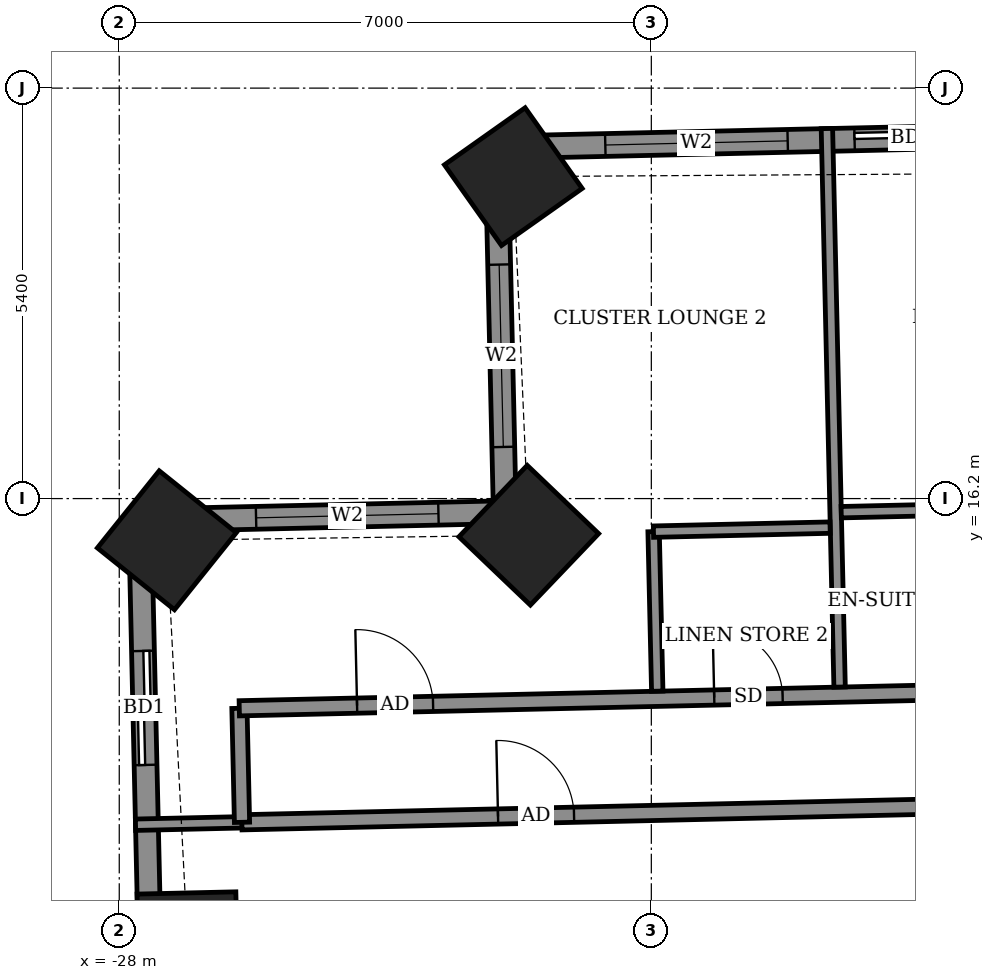
"""IFC4 building model, lengths in metres.
Left out: names, types, materials, properties, quantities, classifications, styles, units other than length and angle.
Written with IfcOpenShell. Run it as: python <this file> out.ifc"""

import sys

from ifc_helpers import new_model, si_unit, direction, frame, frame_2d, origin, origin_2d, place, context, subcontext, project, spatial, rectangle, extrude, element, fill, save


model = new_model("IFC4")
c1 = context("Model", 3, precision=1e-05, world=origin(), true_north=direction((0.0, 1.0)))
c2 = subcontext(c1, "Body", "Model", "MODEL_VIEW")
j1 = project(units=[si_unit("LENGTHUNIT", "METRE"), si_unit("PLANEANGLEUNIT", "RADIAN")], contexts=[c1])
p1 = place(None, origin())
s1 = spatial("IfcSite", under=j1, at=p1, CompositionType="ELEMENT")
p2 = place(p1, origin())
s2 = spatial("IfcBuilding", under=s1, at=p2, CompositionType="ELEMENT")
p3 = place(p2, frame((0.0, 0.0, 140.9)))
s3 = spatial("IfcBuildingStorey", under=s2, at=p3, CompositionType="ELEMENT", Elevation=140.9)
for number, where, z_axis, x_axis in (
    (1, (-22.816, 20.435, -0.55), (0.0, 0.0, 1.0), (-0.816, -0.577, 0.0)),
    (2, (-22.612, 15.718, -0.55), (0.0, 0.0, 1.0), (-0.691, -0.723, 0.0)),
    (3, (-27.374, 15.651, -0.55), (0.0, 0.0, 1.0), (-0.626, -0.78, 0.0)),
    (4, (-27.101, 10.362, -0.55), (0.0, 0.0, 1.0), (0.023, -1.0, 0.0)),
):
    element("IfcColumn", number, at=place(p3, frame(where, z_axis=z_axis, x_axis=x_axis)), inside=s3, PredefinedType="COLUMN", context=c2, shape_type="SweptSolid", body=[
        extrude(rectangle(XDim=1.3, YDim=1.3, at=origin_2d()), origin(), (0.0, 0.0, 1.0), 3.6),
    ])
p4 = place(p3, frame((19.396, 21.782, 0.0), z_axis=(0.0, 0.0, 1.0), x_axis=(-0.999742636707, -0.022686126826, 0.0)))
e5 = element("IfcWall", 5, at=p4, inside=s3, PredefinedType="SOLIDWALL", context=c2, shape_type="SweptSolid", body=[
    extrude(rectangle(XDim=42.444, YDim=0.3, at=frame_2d((21.222, 0.0))), origin(), (0.0, 0.0, 1.0), 3.05),
])
p5 = place(p4, frame((1.757, 0.0, 0.0)))
e6 = element("IfcOpeningElement", 6, at=p5, cuts=e5, PredefinedType="OPENING", context=c2, shape_type="SweptSolid", body=[
    extrude(rectangle(XDim=1.5, YDim=2.4, at=frame_2d((0.75, 1.2))), frame((0.0, 0.16, 0.0), z_axis=(0.0, -1.0, 0.0), x_axis=(1.0, 0.0, 0.0)), (0.0, 0.0, 1.0), 0.32),
])
p6 = place(p4, frame((4.634, 0.0, 0.0)))
e7 = element("IfcOpeningElement", 7, at=p6, cuts=e5, PredefinedType="OPENING", context=c2, shape_type="SweptSolid", body=[
    extrude(rectangle(XDim=1.5, YDim=2.4, at=frame_2d((0.75, 1.2))), frame((0.0, 0.16, 0.0), z_axis=(0.0, -1.0, 0.0), x_axis=(1.0, 0.0, 0.0)), (0.0, 0.0, 1.0), 0.32),
])
p7 = place(p4, frame((9.769, 0.0, 0.0)))
e8 = element("IfcOpeningElement", 8, at=p7, cuts=e5, PredefinedType="OPENING", context=c2, shape_type="SweptSolid", body=[
    extrude(rectangle(XDim=1.5, YDim=2.4, at=frame_2d((0.75, 1.2))), frame((0.0, 0.16, 0.0), z_axis=(0.0, -1.0, 0.0), x_axis=(1.0, 0.0, 0.0)), (0.0, 0.0, 1.0), 0.32),
])
p8 = place(p4, frame((14.946, 0.0, 0.0)))
e9 = element("IfcOpeningElement", 9, at=p8, cuts=e5, PredefinedType="OPENING", context=c2, shape_type="SweptSolid", body=[
    extrude(rectangle(XDim=1.5, YDim=2.4, at=frame_2d((0.75, 1.2))), frame((0.0, 0.16, 0.0), z_axis=(0.0, -1.0, 0.0), x_axis=(1.0, 0.0, 0.0)), (0.0, 0.0, 1.0), 0.32),
])
p9 = place(p4, frame((18.108, 0.0, 0.0)))
e10 = element("IfcOpeningElement", 10, at=p9, cuts=e5, PredefinedType="OPENING", context=c2, shape_type="SweptSolid", body=[
    extrude(rectangle(XDim=1.5, YDim=2.4, at=frame_2d((0.75, 1.2))), frame((0.0, 0.16, 0.0), z_axis=(0.0, -1.0, 0.0), x_axis=(1.0, 0.0, 0.0)), (0.0, 0.0, 1.0), 0.32),
])
p10 = place(p4, frame((22.733, 0.0, 0.0)))
e11 = element("IfcOpeningElement", 11, at=p10, cuts=e5, PredefinedType="OPENING", context=c2, shape_type="SweptSolid", body=[
    extrude(rectangle(XDim=1.5, YDim=2.4, at=frame_2d((0.75, 1.2))), frame((0.0, 0.16, 0.0), z_axis=(0.0, -1.0, 0.0), x_axis=(1.0, 0.0, 0.0)), (0.0, 0.0, 1.0), 0.32),
])
p11 = place(p4, frame((25.895, 0.0, 0.0)))
e12 = element("IfcOpeningElement", 12, at=p11, cuts=e5, PredefinedType="OPENING", context=c2, shape_type="SweptSolid", body=[
    extrude(rectangle(XDim=1.5, YDim=2.4, at=frame_2d((0.75, 1.2))), frame((0.0, 0.16, 0.0), z_axis=(0.0, -1.0, 0.0), x_axis=(1.0, 0.0, 0.0)), (0.0, 0.0, 1.0), 0.32),
])
p12 = place(p4, frame((30.944, 0.0, 0.0)))
e13 = element("IfcOpeningElement", 13, at=p12, cuts=e5, PredefinedType="OPENING", context=c2, shape_type="SweptSolid", body=[
    extrude(rectangle(XDim=1.5, YDim=2.4, at=frame_2d((0.75, 1.2))), frame((0.0, 0.16, 0.0), z_axis=(0.0, -1.0, 0.0), x_axis=(1.0, 0.0, 0.0)), (0.0, 0.0, 1.0), 0.32),
])
p13 = place(p4, frame((36.232, 0.0, 0.0)))
e14 = element("IfcOpeningElement", 14, at=p13, cuts=e5, PredefinedType="OPENING", context=c2, shape_type="SweptSolid", body=[
    extrude(rectangle(XDim=1.5, YDim=2.4, at=frame_2d((0.75, 1.2))), frame((0.0, 0.16, 0.0), z_axis=(0.0, -1.0, 0.0), x_axis=(1.0, 0.0, 0.0)), (0.0, 0.0, 1.0), 0.32),
])
p14 = place(p4, frame((38.612, 0.0, 0.9)))
e15 = element("IfcOpeningElement", 15, at=p14, cuts=e5, PredefinedType="OPENING", context=c2, shape_type="SweptSolid", body=[
    extrude(rectangle(XDim=2.4, YDim=1.5, at=frame_2d((1.2, 0.75))), frame((0.0, 0.16, 0.0), z_axis=(0.0, -1.0, 0.0), x_axis=(1.0, 0.0, 0.0)), (0.0, 0.0, 1.0), 0.32),
])
p15 = place(p3, frame((-23.037, 20.819, 0.0), z_axis=(0.0, 0.0, 1.0), x_axis=(0.022738738327, -0.999741441463, 0.0)))
e16 = element("IfcWall", 16, at=p15, inside=s3, PredefinedType="SOLIDWALL", context=c2, shape_type="SweptSolid", body=[
    extrude(rectangle(XDim=4.799, YDim=0.3, at=frame_2d((2.4, 0.0))), origin(), (0.0, 0.0, 1.0), 2.55),
])
p16 = place(p15, frame((1.541, 0.0, 0.9)))
e17 = element("IfcOpeningElement", 17, at=p16, cuts=e16, PredefinedType="OPENING", context=c2, shape_type="SweptSolid", body=[
    extrude(rectangle(XDim=2.4, YDim=1.5, at=frame_2d((1.2, 0.75))), frame((0.0, 0.16, 0.0), z_axis=(0.0, -1.0, 0.0), x_axis=(1.0, 0.0, 0.0)), (0.0, 0.0, 1.0), 0.32),
])
p17 = place(p3, frame((-22.928, 16.021, 0.0), z_axis=(0.0, 0.0, 1.0), x_axis=(-0.999742701292, -0.022683280499, 0.0)))
e18 = element("IfcWall", 18, at=p17, inside=s3, PredefinedType="SOLIDWALL", context=c2, shape_type="SweptSolid", body=[
    extrude(rectangle(XDim=4.8, YDim=0.3, at=frame_2d((2.4, 0.0))), origin(), (0.0, 0.0, 1.0), 2.55),
])
p18 = place(p17, frame((0.873, 0.0, 0.9)))
e19 = element("IfcOpeningElement", 19, at=p18, cuts=e18, PredefinedType="OPENING", context=c2, shape_type="SweptSolid", body=[
    extrude(rectangle(XDim=2.4, YDim=1.5, at=frame_2d((1.2, 0.75))), frame((0.0, 0.16, 0.0), z_axis=(0.0, -1.0, 0.0), x_axis=(1.0, 0.0, 0.0)), (0.0, 0.0, 1.0), 0.32),
])
p19 = place(p3, frame((-27.727, 15.912, 0.0), z_axis=(0.0, 0.0, 1.0), x_axis=(0.022690078929, -0.999742547018, 0.0)))
e20 = element("IfcWall", 20, at=p19, inside=s3, PredefinedType="SOLIDWALL", context=c2, shape_type="SweptSolid", body=[
    extrude(rectangle(XDim=11.33, YDim=0.3, at=frame_2d((5.665, 0.0))), origin(), (0.0, 0.0, 1.0), 3.05),
])
p20 = place(p19, frame((1.717, 0.0, 0.0)))
e21 = element("IfcOpeningElement", 21, at=p20, cuts=e20, PredefinedType="OPENING", context=c2, shape_type="SweptSolid", body=[
    extrude(rectangle(XDim=1.5, YDim=2.4, at=frame_2d((0.75, 1.2))), frame((0.0, 0.16, 0.0), z_axis=(0.0, -1.0, 0.0), x_axis=(1.0, 0.0, 0.0)), (0.0, 0.0, 1.0), 0.32),
])
p21 = place(p19, frame((7.725, 0.0, 0.9)))
e22 = element("IfcOpeningElement", 22, at=p21, cuts=e20, PredefinedType="OPENING", context=c2, shape_type="SweptSolid", body=[
    extrude(rectangle(XDim=2.4, YDim=1.5, at=frame_2d((1.2, 0.75))), frame((0.0, 0.16, 0.0), z_axis=(0.0, -1.0, 0.0), x_axis=(1.0, 0.0, 0.0)), (0.0, 0.0, 1.0), 0.32),
])
p22 = place(p3, frame((-27.786, 11.909, 0.0), z_axis=(0.0, 0.0, 1.0), x_axis=(0.999740216184, 0.022792545827, 0.0)))
e23 = element("IfcWall", 23, at=p22, inside=s3, PredefinedType="PARTITIONING", context=c2, shape_type="SweptSolid", body=[
    extrude(rectangle(XDim=1.403, YDim=0.15, at=frame_2d((0.702, 0.0))), origin(), (0.0, 0.0, 1.0), 2.55),
])
p23 = place(p3, frame((-26.387, 11.941, 0.0), z_axis=(0.0, 0.0, 1.0), x_axis=(0.999741076645, 0.022754772455, 0.0)))
e24 = element("IfcWall", 24, at=p23, inside=s3, PredefinedType="PARTITIONING", context=c2, shape_type="SweptSolid", body=[
    extrude(rectangle(XDim=9.141, YDim=0.2, at=frame_2d((4.571, 0.0))), origin(), (0.0, 0.0, 1.0), 3.05),
])
p24 = place(p23, frame((3.371, 0.0, 0.0)))
e25 = element("IfcOpeningElement", 25, at=p24, cuts=e24, PredefinedType="OPENING", context=c2, shape_type="SweptSolid", body=[
    extrude(rectangle(XDim=1.0, YDim=2.1, at=frame_2d((0.5, 1.05))), frame((0.0, 0.11, 0.0), z_axis=(0.0, -1.0, 0.0), x_axis=(1.0, 0.0, 0.0)), (0.0, 0.0, 1.0), 0.22),
])
p25 = place(p3, frame((-26.385, 11.941, 0.0), z_axis=(0.0, 0.0, 1.0), x_axis=(-0.022617910375, 0.999744182344, 0.0)))
e26 = element("IfcWall", 26, at=p25, inside=s3, PredefinedType="PARTITIONING", context=c2, shape_type="SweptSolid", body=[
    extrude(rectangle(XDim=1.5, YDim=0.2, at=frame_2d((0.75, 0.0))), origin(), (0.0, 0.0, 1.0), 3.05),
])
p26 = place(p3, frame((-26.421, 13.441, 0.0), z_axis=(0.0, 0.0, 1.0), x_axis=(0.999742754064, 0.022680954485, 0.0)))
e27 = element("IfcWall", 27, at=p26, inside=s3, PredefinedType="PARTITIONING", context=c2, shape_type="SweptSolid", body=[
    extrude(rectangle(XDim=48.945, YDim=0.2, at=frame_2d((24.472, 0.0))), origin(), (0.0, 0.0, 1.0), 3.05),
])
p27 = place(p26, frame((46.772, 0.0, 0.0)))
e28 = element("IfcOpeningElement", 28, at=p27, cuts=e27, PredefinedType="OPENING", context=c2, shape_type="SweptSolid", body=[
    extrude(rectangle(XDim=1.0, YDim=2.1, at=frame_2d((0.5, 1.05))), frame((0.0, 0.11, 0.0), z_axis=(0.0, -1.0, 0.0), x_axis=(1.0, 0.0, 0.0)), (0.0, 0.0, 1.0), 0.22),
])
p28 = place(p26, frame((42.55, 0.0, 0.0)))
e29 = element("IfcOpeningElement", 29, at=p28, cuts=e27, PredefinedType="OPENING", context=c2, shape_type="SweptSolid", body=[
    extrude(rectangle(XDim=0.9, YDim=2.1, at=frame_2d((0.45, 1.05))), frame((0.0, 0.11, 0.0), z_axis=(0.0, -1.0, 0.0), x_axis=(1.0, 0.0, 0.0)), (0.0, 0.0, 1.0), 0.22),
])
p29 = place(p26, frame((38.05, 0.0, 0.0)))
e30 = element("IfcOpeningElement", 30, at=p29, cuts=e27, PredefinedType="OPENING", context=c2, shape_type="SweptSolid", body=[
    extrude(rectangle(XDim=0.9, YDim=2.1, at=frame_2d((0.45, 1.05))), frame((0.0, 0.11, 0.0), z_axis=(0.0, -1.0, 0.0), x_axis=(1.0, 0.0, 0.0)), (0.0, 0.0, 1.0), 0.22),
])
p30 = place(p26, frame((36.225, 0.0, 0.0)))
e31 = element("IfcOpeningElement", 31, at=p30, cuts=e27, PredefinedType="OPENING", context=c2, shape_type="SweptSolid", body=[
    extrude(rectangle(XDim=0.9, YDim=2.1, at=frame_2d((0.45, 1.05))), frame((0.0, 0.11, 0.0), z_axis=(0.0, -1.0, 0.0), x_axis=(1.0, 0.0, 0.0)), (0.0, 0.0, 1.0), 0.22),
])
p31 = place(p26, frame((29.575, 0.0, 0.0)))
e32 = element("IfcOpeningElement", 32, at=p31, cuts=e27, PredefinedType="OPENING", context=c2, shape_type="SweptSolid", body=[
    extrude(rectangle(XDim=0.9, YDim=2.1, at=frame_2d((0.45, 1.05))), frame((0.0, 0.11, 0.0), z_axis=(0.0, -1.0, 0.0), x_axis=(1.0, 0.0, 0.0)), (0.0, 0.0, 1.0), 0.22),
])
p32 = place(p26, frame((27.75, 0.0, 0.0)))
e33 = element("IfcOpeningElement", 33, at=p32, cuts=e27, PredefinedType="OPENING", context=c2, shape_type="SweptSolid", body=[
    extrude(rectangle(XDim=0.9, YDim=2.1, at=frame_2d((0.45, 1.05))), frame((0.0, 0.11, 0.0), z_axis=(0.0, -1.0, 0.0), x_axis=(1.0, 0.0, 0.0)), (0.0, 0.0, 1.0), 0.22),
])
p33 = place(p26, frame((21.125, 0.0, 0.0)))
e34 = element("IfcOpeningElement", 34, at=p33, cuts=e27, PredefinedType="OPENING", context=c2, shape_type="SweptSolid", body=[
    extrude(rectangle(XDim=0.9, YDim=2.1, at=frame_2d((0.45, 1.05))), frame((0.0, 0.11, 0.0), z_axis=(0.0, -1.0, 0.0), x_axis=(1.0, 0.0, 0.0)), (0.0, 0.0, 1.0), 0.22),
])
p34 = place(p26, frame((19.275, 0.0, 0.0)))
e35 = element("IfcOpeningElement", 35, at=p34, cuts=e27, PredefinedType="OPENING", context=c2, shape_type="SweptSolid", body=[
    extrude(rectangle(XDim=0.9, YDim=2.1, at=frame_2d((0.45, 1.05))), frame((0.0, 0.11, 0.0), z_axis=(0.0, -1.0, 0.0), x_axis=(1.0, 0.0, 0.0)), (0.0, 0.0, 1.0), 0.22),
])
p35 = place(p26, frame((12.65, 0.0, 0.0)))
e36 = element("IfcOpeningElement", 36, at=p35, cuts=e27, PredefinedType="OPENING", context=c2, shape_type="SweptSolid", body=[
    extrude(rectangle(XDim=0.9, YDim=2.1, at=frame_2d((0.45, 1.05))), frame((0.0, 0.11, 0.0), z_axis=(0.0, -1.0, 0.0), x_axis=(1.0, 0.0, 0.0)), (0.0, 0.0, 1.0), 0.22),
])
p36 = place(p26, frame((10.8, 0.0, 0.0)))
e37 = element("IfcOpeningElement", 37, at=p36, cuts=e27, PredefinedType="OPENING", context=c2, shape_type="SweptSolid", body=[
    extrude(rectangle(XDim=0.9, YDim=2.1, at=frame_2d((0.45, 1.05))), frame((0.0, 0.11, 0.0), z_axis=(0.0, -1.0, 0.0), x_axis=(1.0, 0.0, 0.0)), (0.0, 0.0, 1.0), 0.22),
])
p37 = place(p26, frame((1.55, 0.0, 0.0)))
e38 = element("IfcOpeningElement", 38, at=p37, cuts=e27, PredefinedType="OPENING", context=c2, shape_type="SweptSolid", body=[
    extrude(rectangle(XDim=1.0, YDim=2.1, at=frame_2d((0.5, 1.05))), frame((0.0, 0.11, 0.0), z_axis=(0.0, -1.0, 0.0), x_axis=(1.0, 0.0, 0.0)), (0.0, 0.0, 1.0), 0.22),
])
p38 = place(p26, frame((6.25, 0.0, 0.0)))
e39 = element("IfcOpeningElement", 39, at=p38, cuts=e27, PredefinedType="OPENING", context=c2, shape_type="SweptSolid", body=[
    extrude(rectangle(XDim=0.9, YDim=2.1, at=frame_2d((0.45, 1.05))), frame((0.0, 0.11, 0.0), z_axis=(0.0, -1.0, 0.0), x_axis=(1.0, 0.0, 0.0)), (0.0, 0.0, 1.0), 0.22),
])
p39 = place(p3, frame((-20.922, 13.666, 0.0), z_axis=(0.0, 0.0, 1.0), x_axis=(-0.022792727877, 0.999740212033, 0.0)))
e40 = element("IfcWall", 40, at=p39, inside=s3, PredefinedType="PARTITIONING", context=c2, shape_type="SweptSolid", body=[
    extrude(rectangle(XDim=2.099, YDim=0.15, at=frame_2d((1.05, 0.0))), origin(), (0.0, 0.0, 1.0), 3.05),
])
p40 = place(p3, frame((-18.523, 13.72, 0.0), z_axis=(0.0, 0.0, 1.0), x_axis=(-0.022719896304, 0.99974186984, 0.0)))
e41 = element("IfcWall", 41, at=p40, inside=s3, PredefinedType="PARTITIONING", context=c2, shape_type="SweptSolid", body=[
    extrude(rectangle(XDim=7.35, YDim=0.15, at=frame_2d((3.675, 0.0))), origin(), (0.0, 0.0, 1.0), 2.55),
])
for number, where, z_axis, x_axis in (
    (42, (-20.972, 15.765, 0.0), (0.0, 0.0, 1.0), (1.0, 0.023, 0.0)),
    (43, (-18.502, 16.021, 0.0), (0.0, 0.0, 1.0), (1.0, 0.023, 0.0)),
):
    element("IfcWall", number, at=place(p3, frame(where, z_axis=z_axis, x_axis=x_axis)), inside=s3, PredefinedType="PARTITIONING", context=c2, shape_type="SweptSolid", body=[
        extrude(rectangle(XDim=2.324, YDim=0.15, at=frame_2d((1.162, 0.0))), origin(), (0.0, 0.0, 1.0), 3.05),
    ])
p41 = place(p13, origin())
e44 = element("IfcDoor", 44, at=p41, inside=s3, OperationType="SLIDING_TO_LEFT", PredefinedType="DOOR", context=c2, shape_type="SweptSolid", body=[
    extrude(rectangle(XDim=1.5, YDim=2.4, at=frame_2d((0.75, 1.2))), frame((0.0, 0.025, 0.0), z_axis=(0.0, -1.0, 0.0), x_axis=(1.0, 0.0, 0.0)), (0.0, 0.0, 1.0), 0.05),
])
fill(e14, e44)
p42 = place(p14, origin())
e45 = element("IfcWindow", 45, at=p42, inside=s3, PartitioningType="DOUBLE_PANEL_VERTICAL", PredefinedType="WINDOW", context=c2, shape_type="SweptSolid", body=[
    extrude(rectangle(XDim=2.4, YDim=1.5, at=frame_2d((1.2, 0.75))), frame((0.0, 0.03, 0.0), z_axis=(0.0, -1.0, 0.0), x_axis=(1.0, 0.0, 0.0)), (0.0, 0.0, 1.0), 0.06),
])
fill(e15, e45)
p43 = place(p16, origin())
e46 = element("IfcWindow", 46, at=p43, inside=s3, PartitioningType="DOUBLE_PANEL_VERTICAL", PredefinedType="WINDOW", context=c2, shape_type="SweptSolid", body=[
    extrude(rectangle(XDim=2.4, YDim=1.5, at=frame_2d((1.2, 0.75))), frame((0.0, 0.03, 0.0), z_axis=(0.0, -1.0, 0.0), x_axis=(1.0, 0.0, 0.0)), (0.0, 0.0, 1.0), 0.06),
])
fill(e17, e46)
p44 = place(p18, origin())
e47 = element("IfcWindow", 47, at=p44, inside=s3, PartitioningType="DOUBLE_PANEL_VERTICAL", PredefinedType="WINDOW", context=c2, shape_type="SweptSolid", body=[
    extrude(rectangle(XDim=2.4, YDim=1.5, at=frame_2d((1.2, 0.75))), frame((0.0, 0.03, 0.0), z_axis=(0.0, -1.0, 0.0), x_axis=(1.0, 0.0, 0.0)), (0.0, 0.0, 1.0), 0.06),
])
fill(e19, e47)
p45 = place(p20, origin())
e48 = element("IfcDoor", 48, at=p45, inside=s3, OperationType="SLIDING_TO_LEFT", PredefinedType="DOOR", context=c2, shape_type="SweptSolid", body=[
    extrude(rectangle(XDim=1.5, YDim=2.4, at=frame_2d((0.75, 1.2))), frame((0.0, 0.025, 0.0), z_axis=(0.0, -1.0, 0.0), x_axis=(1.0, 0.0, 0.0)), (0.0, 0.0, 1.0), 0.05),
])
fill(e21, e48)
p46 = place(p37, origin())
e49 = element("IfcDoor", 49, at=p46, inside=s3, OperationType="SINGLE_SWING_LEFT", PredefinedType="DOOR", context=c2, shape_type="SweptSolid", body=[
    extrude(rectangle(XDim=1.0, YDim=2.1, at=frame_2d((0.5, 1.05))), frame((0.0, 0.025, 0.0), z_axis=(0.0, -1.0, 0.0), x_axis=(1.0, 0.0, 0.0)), (0.0, 0.0, 1.0), 0.05),
])
fill(e38, e49)
p47 = place(p38, origin())
e50 = element("IfcDoor", 50, at=p47, inside=s3, OperationType="SINGLE_SWING_RIGHT", PredefinedType="DOOR", context=c2, shape_type="SweptSolid", body=[
    extrude(rectangle(XDim=0.9, YDim=2.1, at=frame_2d((0.45, 1.05))), frame((0.0, 0.025, 0.0), z_axis=(0.0, -1.0, 0.0), x_axis=(1.0, 0.0, 0.0)), (0.0, 0.0, 1.0), 0.05),
])
fill(e39, e50)
p48 = place(p24, origin())
e51 = element("IfcDoor", 51, at=p48, inside=s3, OperationType="SINGLE_SWING_RIGHT", PredefinedType="DOOR", context=c2, shape_type="SweptSolid", body=[
    extrude(rectangle(XDim=1.0, YDim=2.1, at=frame_2d((0.5, 1.05))), frame((0.0, 0.025, 0.0), z_axis=(0.0, -1.0, 0.0), x_axis=(1.0, 0.0, 0.0)), (0.0, 0.0, 1.0), 0.05),
])
fill(e25, e51)
save(model, sys.argv[1])
